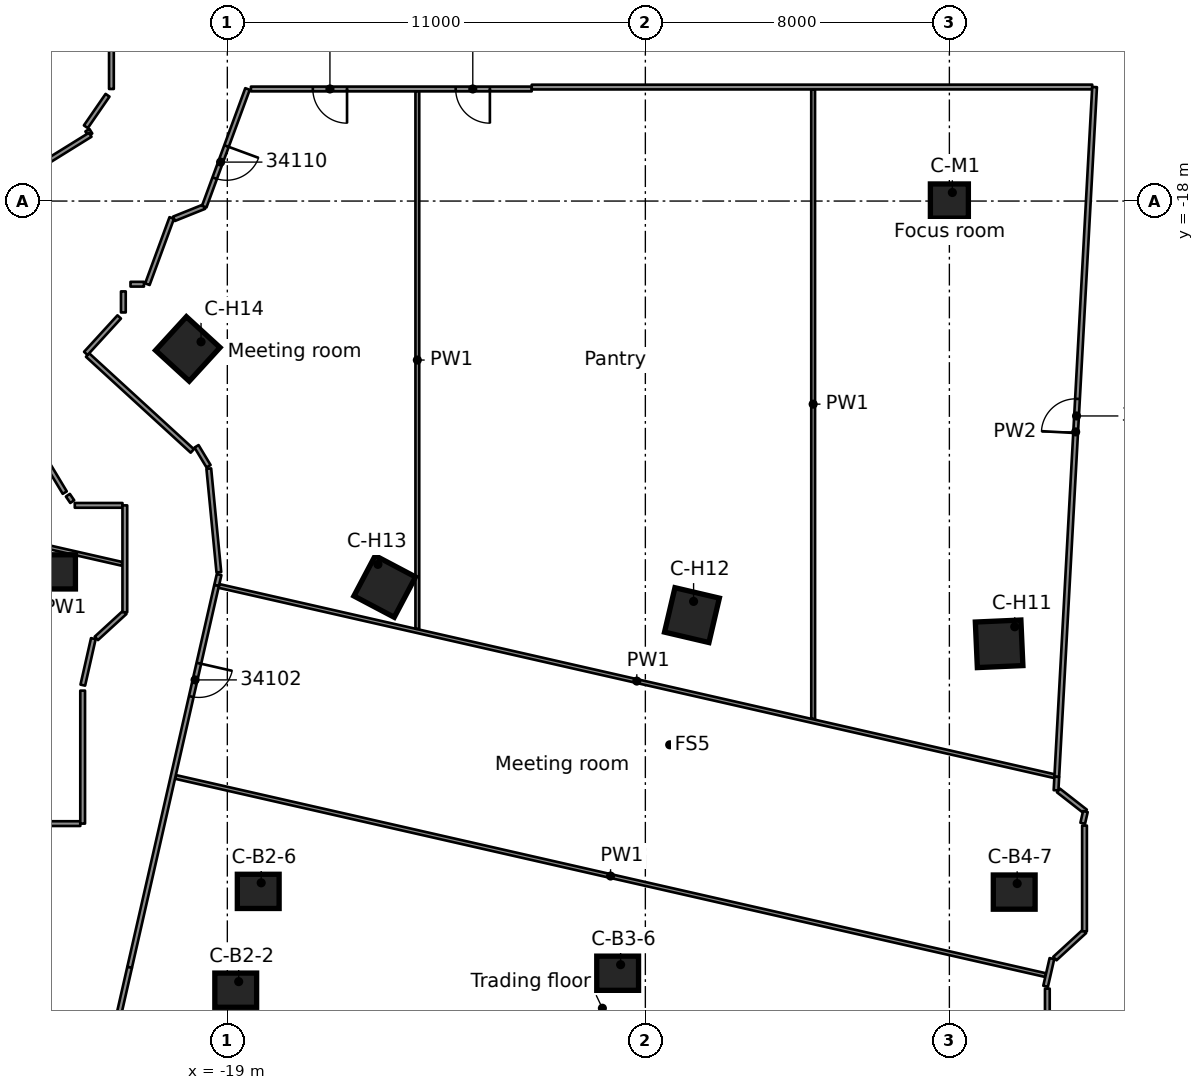
"""IFC4 building model, lengths in metres.
Left out: names, types, materials, properties, quantities, classifications, styles, units other than length and angle.
Written with IfcOpenShell. Run it as: python <this file> out.ifc"""

import sys

from ifc_helpers import new_model, si_unit, direction, frame, frame_2d, origin, origin_2d, place, context, subcontext, project, spatial, rectangle, extrude, element, fill, save


model = new_model("IFC4")
c1 = context("Model", 3, precision=1e-05, world=origin(), true_north=direction((0.0, 1.0)))
c2 = subcontext(c1, "Body", "Model", "MODEL_VIEW")
j1 = project(units=[si_unit("LENGTHUNIT", "METRE"), si_unit("PLANEANGLEUNIT", "RADIAN")], contexts=[c1])
p1 = place(None, origin())
s1 = spatial("IfcSite", under=j1, at=p1, CompositionType="ELEMENT")
p2 = place(p1, origin())
s2 = spatial("IfcBuilding", under=s1, at=p2, CompositionType="ELEMENT")
p3 = place(p2, frame((0.0, 0.0, 167.1)))
s3 = spatial("IfcBuildingStorey", under=s2, at=p3, CompositionType="ELEMENT", Elevation=167.1)
for number, where, z_axis, x_axis in (
    (1, (-23.547, -27.757, 0.0), (0.0, 0.0, 1.0), (1.0, 0.0, 0.0)),
    (2, (-18.779, -38.764, 0.0), (0.0, 0.0, 1.0), (1.0, 0.0, 0.0)),
    (3, (-18.187, -36.164, 0.0), (0.0, 0.0, 1.0), (1.0, 0.0, 0.0)),
    (4, (-8.729, -38.318, 0.0), (0.0, 0.0, 1.0), (1.0, 0.0, 0.0)),
    (5, (1.706, -36.183, 0.0), (0.0, 0.0, 1.0), (1.0, 0.0, 0.0)),
):
    element("IfcColumn", number, at=place(p3, frame(where, z_axis=z_axis, x_axis=x_axis)), inside=s3, PredefinedType="COLUMN", context=c2, shape_type="SweptSolid", body=[
        extrude(rectangle(XDim=1.1, YDim=0.9, at=origin_2d()), origin(), (0.0, 0.0, 1.0), 3.5),
    ])
for number, where, z_axis, x_axis in (
    (6, (1.309, -29.65, 0.0), (0.0, 0.0, 1.0), (0.044, -0.999, 0.0)),
    (7, (-6.774, -28.895, 0.0), (0.0, 0.0, 1.0), (-0.228, -0.974, 0.0)),
    (8, (-14.858, -28.141, 0.0), (0.0, 0.0, 1.0), (-0.467, -0.884, 0.0)),
    (9, (-20.04, -21.891, 0.0), (0.0, 0.0, 1.0), (-0.675, -0.738, 0.0)),
):
    element("IfcColumn", number, at=place(p3, frame(where, z_axis=z_axis, x_axis=x_axis)), inside=s3, PredefinedType="COLUMN", context=c2, shape_type="SweptSolid", body=[
        extrude(rectangle(XDim=1.2, YDim=1.2, at=origin_2d()), origin(), (0.0, 0.0, 1.0), 3.5),
    ])
p4 = place(p3, frame((0.0, -18.0, 0.0), z_axis=(0.0, 0.0, 1.0), x_axis=(1.0, 0.0, 0.0)))
e10 = element("IfcColumn", 10, at=p4, inside=s3, PredefinedType="COLUMN", context=c2, shape_type="SweptSolid", body=[
    extrude(rectangle(XDim=1.0, YDim=0.9, at=origin_2d()), origin(), (0.0, 0.0, 1.0), 3.5),
])
p5 = place(p3, frame((-3.585, -15.062, 0.0), z_axis=(0.0, 0.0, 1.0), x_axis=(5.895705e-05, -0.999999998262, 0.0)))
e11 = element("IfcWall", 11, at=p5, inside=s3, PredefinedType="PARTITIONING", context=c2, shape_type="SweptSolid", body=[
    extrude(rectangle(XDim=16.564, YDim=0.1, at=frame_2d((8.282, 0.0))), origin(), (0.0, 0.0, 1.0), 3.06),
])
p6 = place(p3, frame((-19.488, -25.04, 0.0), z_axis=(0.0, 0.0, 1.0), x_axis=(0.096768426033, -0.995306923377, 0.0)))
e12 = element("IfcWall", 12, at=p6, inside=s3, PredefinedType="PARTITIONING", context=c2, shape_type="SweptSolid", body=[
    extrude(rectangle(XDim=2.74, YDim=0.125, at=frame_2d((1.37, 0.0))), origin(), (0.0, 0.0, 1.0), 3.06),
])
p7 = place(p3, frame((-25.194, -22.482, 0.0), z_axis=(0.0, 0.0, 1.0), x_axis=(0.514871972741, -0.857267083053, 0.0)))
e13 = element("IfcWall", 13, at=p7, inside=s3, PredefinedType="PARTITIONING", context=c2, shape_type="SweptSolid", body=[
    extrude(rectangle(XDim=3.721, YDim=0.125, at=frame_2d((1.861, 0.0))), origin(), (0.0, 0.0, 1.0), 3.06),
])
p8 = place(p3, frame((-19.81, -24.453, 0.0), z_axis=(0.0, 0.0, 1.0), x_axis=(0.515783755321, -0.856718809031, 0.0)))
e14 = element("IfcWall", 14, at=p8, inside=s3, PredefinedType="PARTITIONING", context=c2, shape_type="SweptSolid", body=[
    extrude(rectangle(XDim=0.613, YDim=0.125, at=frame_2d((0.307, 0.0))), origin(), (0.0, 0.0, 1.0), 3.06),
])
p9 = place(p3, frame((-22.682, -16.135, 0.0), z_axis=(0.0, 0.0, 1.0), x_axis=(0.530154156877, -0.847901273702, 0.0)))
e15 = element("IfcWall", 15, at=p9, inside=s3, PredefinedType="PARTITIONING", context=c2, shape_type="SweptSolid", body=[
    extrude(rectangle(XDim=0.141, YDim=0.125, at=frame_2d((0.071, 0.0))), origin(), (0.0, 0.0, 1.0), 3.06),
])
p10 = place(p3, frame((-23.196, -25.74, 0.0), z_axis=(0.0, 0.0, 1.0), x_axis=(0.562669402068, -0.826682008983, 0.0)))
e16 = element("IfcWall", 16, at=p10, inside=s3, PredefinedType="PARTITIONING", context=c2, shape_type="SweptSolid", body=[
    extrude(rectangle(XDim=0.204, YDim=0.125, at=frame_2d((0.102, 0.0))), origin(), (0.0, 0.0, 1.0), 3.06),
])
p11 = place(p3, frame((-22.678, -22.051, 0.0), z_axis=(0.0, 0.0, 1.0), x_axis=(0.737457793855, -0.675393220489, 0.0)))
e17 = element("IfcWall", 17, at=p11, inside=s3, PredefinedType="PARTITIONING", context=c2, shape_type="SweptSolid", body=[
    extrude(rectangle(XDim=3.737, YDim=0.125, at=frame_2d((1.869, 0.0))), origin(), (0.0, 0.0, 1.0), 3.06),
])
p12 = place(p3, frame((-20.404, -18.467, 0.0), z_axis=(0.0, 0.0, 1.0), x_axis=(0.927827745757, 0.373008946546, 0.0)))
e18 = element("IfcWall", 18, at=p12, inside=s3, PredefinedType="PARTITIONING", context=c2, shape_type="SweptSolid", body=[
    extrude(rectangle(XDim=0.858, YDim=0.125, at=frame_2d((0.429, 0.0))), origin(), (0.0, 0.0, 1.0), 3.06),
])
p13 = place(p3, frame((-20.366, -33.152, 0.0), z_axis=(0.0, 0.0, 1.0), x_axis=(0.975030849226, -0.222069455479, 0.0)))
e19 = element("IfcWall", 19, at=p13, inside=s3, PredefinedType="PARTITIONING", context=c2, shape_type="SweptSolid", body=[
    extrude(rectangle(XDim=23.487, YDim=0.1, at=frame_2d((11.744, 0.0))), origin(), (0.0, 0.0, 1.0), 3.06),
])
p14 = place(p3, frame((-26.784, -26.404, 0.0), z_axis=(0.0, 0.0, 1.0), x_axis=(0.975025922796, -0.22209108464, 0.0)))
e20 = element("IfcWall", 20, at=p14, inside=s3, PredefinedType="PARTITIONING", context=c2, shape_type="SweptSolid", body=[
    extrude(rectangle(XDim=5.141, YDim=0.1, at=frame_2d((2.571, 0.0))), origin(), (0.0, 0.0, 1.0), 3.06),
])
p15 = place(p3, frame((-19.221, -28.127, 0.0), z_axis=(0.0, 0.0, 1.0), x_axis=(0.975047400712, -0.22199677107, 0.0)))
e21 = element("IfcWall", 21, at=p15, inside=s3, PredefinedType="PARTITIONING", context=c2, shape_type="SweptSolid", body=[
    extrude(rectangle(XDim=22.555, YDim=0.1, at=frame_2d((11.277, 0.0))), origin(), (0.0, 0.0, 1.0), 3.06),
])
p16 = place(p3, frame((2.869, -33.508, 0.0), z_axis=(0.0, 0.0, 1.0), x_axis=(0.787979198173, -0.615701862306, 0.0)))
e22 = element("IfcWall", 22, at=p16, inside=s3, PredefinedType="PARTITIONING", context=c2, shape_type="SweptSolid", body=[
    extrude(rectangle(XDim=0.901, YDim=0.125, at=frame_2d((0.451, 0.0))), origin(), (0.0, 0.0, 1.0), 3.06),
])
p17 = place(p3, frame((2.776, -37.932, 0.0), z_axis=(0.0, 0.0, 1.0), x_axis=(0.736321314263, 0.676632043404, 0.0)))
e23 = element("IfcWall", 23, at=p17, inside=s3, PredefinedType="PARTITIONING", context=c2, shape_type="SweptSolid", body=[
    extrude(rectangle(XDim=1.059, YDim=0.125, at=frame_2d((0.53, 0.0))), origin(), (0.0, 0.0, 1.0), 3.06),
])
p18 = place(p3, frame((-24.325, -34.381, 0.0), z_axis=(0.0, 0.0, 1.0), x_axis=(1.0, 0.0, 0.0)))
e24 = element("IfcWall", 24, at=p18, inside=s3, PredefinedType="PARTITIONING", context=c2, shape_type="SweptSolid", body=[
    extrude(rectangle(XDim=1.456, YDim=0.125, at=frame_2d((0.728, 0.0))), origin(), (0.0, 0.0, 1.0), 3.06),
])
p19 = place(p3, frame((-22.447, -29.507, 0.0), z_axis=(0.0, 0.0, 1.0), x_axis=(0.737393225099, 0.67546371596, 0.0)))
e25 = element("IfcWall", 25, at=p19, inside=s3, PredefinedType="PARTITIONING", context=c2, shape_type="SweptSolid", body=[
    extrude(rectangle(XDim=1.017, YDim=0.125, at=frame_2d((0.509, 0.0))), origin(), (0.0, 0.0, 1.0), 3.06),
])
p20 = place(p3, frame((-23.014, -26.007, 0.0), z_axis=(0.0, 0.0, 1.0), x_axis=(1.0, 0.0, 0.0)))
e26 = element("IfcWall", 26, at=p20, inside=s3, PredefinedType="PARTITIONING", context=c2, shape_type="SweptSolid", body=[
    extrude(rectangle(XDim=1.255, YDim=0.125, at=frame_2d((0.627, 0.0))), origin(), (0.0, 0.0, 1.0), 3.06),
])
p21 = place(p3, frame((-21.548, -20.188, 0.0), z_axis=(0.0, 0.0, 1.0), x_axis=(1.0, 0.0, 0.0)))
e27 = element("IfcWall", 27, at=p21, inside=s3, PredefinedType="PARTITIONING", context=c2, shape_type="SweptSolid", body=[
    extrude(rectangle(XDim=0.354, YDim=0.125, at=frame_2d((0.177, 0.0))), origin(), (0.0, 0.0, 1.0), 3.06),
])
p22 = place(p3, frame((-10.991, -15.051, 0.0), z_axis=(0.0, 0.0, 1.0), x_axis=(-1.0, 0.0, 0.0)))
e28 = element("IfcWall", 28, at=p22, inside=s3, PredefinedType="PARTITIONING", context=c2, shape_type="SweptSolid", body=[
    extrude(rectangle(XDim=7.388, YDim=0.125, at=frame_2d((3.694, 0.0))), origin(), (0.0, 0.0, 1.0), 3.06),
])
p23 = place(p22, frame((4.859, 0.0, 0.0)))
e29 = element("IfcOpeningElement", 29, at=p23, cuts=e28, PredefinedType="OPENING", context=c2, shape_type="SweptSolid", body=[
    extrude(rectangle(XDim=0.9, YDim=2.1, at=frame_2d((0.45, 1.05))), frame((0.0, 0.073, 0.0), z_axis=(0.0, -1.0, 0.0), x_axis=(1.0, 0.0, 0.0)), (0.0, 0.0, 1.0), 0.145),
])
p24 = place(p22, frame((1.1, 0.0, 0.0)))
e30 = element("IfcOpeningElement", 30, at=p24, cuts=e28, PredefinedType="OPENING", context=c2, shape_type="SweptSolid", body=[
    extrude(rectangle(XDim=0.9, YDim=2.1, at=frame_2d((0.45, 1.05))), frame((0.0, 0.073, 0.0), z_axis=(0.0, -1.0, 0.0), x_axis=(1.0, 0.0, 0.0)), (0.0, 0.0, 1.0), 0.145),
])
p25 = place(p3, frame((-10.99, -15.001, 0.0), z_axis=(0.0, 0.0, 1.0), x_axis=(0.999999991232, 0.000132424021, 0.0)))
e31 = element("IfcWall", 31, at=p25, inside=s3, PredefinedType="PARTITIONING", context=c2, shape_type="SweptSolid", body=[
    extrude(rectangle(XDim=14.749, YDim=0.125, at=frame_2d((7.375, 0.0))), origin(), (0.0, 0.0, 1.0), 3.06),
])
p26 = place(p3, frame((-24.779, -17.603, 0.0), z_axis=(0.0, 0.0, 1.0), x_axis=(0.849651970117, 0.527343843878, 0.0)))
e32 = element("IfcWall", 32, at=p26, inside=s3, PredefinedType="PARTITIONING", context=c2, shape_type="SweptSolid", body=[
    extrude(rectangle(XDim=2.556, YDim=0.125, at=frame_2d((1.278, 0.0))), origin(), (0.0, 0.0, 1.0), 3.06),
])
p27 = place(p3, frame((-22.724, -22.009, 0.0), z_axis=(0.0, 0.0, 1.0), x_axis=(0.675384834857, 0.737465473663, 0.0)))
e33 = element("IfcWall", 33, at=p27, inside=s3, PredefinedType="PARTITIONING", context=c2, shape_type="SweptSolid", body=[
    extrude(rectangle(XDim=1.302, YDim=0.125, at=frame_2d((0.651, 0.0))), origin(), (0.0, 0.0, 1.0), 3.06),
])
p28 = place(p3, frame((-22.723, -16.045, 0.0), z_axis=(0.0, 0.0, 1.0), x_axis=(0.567177272103, 0.823595739431, 0.0)))
e34 = element("IfcWall", 34, at=p28, inside=s3, PredefinedType="PARTITIONING", context=c2, shape_type="SweptSolid", body=[
    extrude(rectangle(XDim=1.006, YDim=0.125, at=frame_2d((0.503, 0.0))), origin(), (0.0, 0.0, 1.0), 3.06),
])
p29 = place(p3, frame((-18.469, -15.051, 0.0), z_axis=(0.0, 0.0, 1.0), x_axis=(-0.345252599318, -0.938509798918, 0.0)))
e35 = element("IfcWall", 35, at=p29, inside=s3, PredefinedType="PARTITIONING", context=c2, shape_type="SweptSolid", body=[
    extrude(rectangle(XDim=3.299, YDim=0.125, at=frame_2d((1.649, 0.0))), origin(), (0.0, 0.0, 1.0), 3.06),
])
p30 = place(p29, frame((1.6, 0.0, 0.0)))
e36 = element("IfcOpeningElement", 36, at=p30, cuts=e35, PredefinedType="OPENING", context=c2, shape_type="SweptSolid", body=[
    extrude(rectangle(XDim=0.9, YDim=2.1, at=frame_2d((0.45, 1.05))), frame((0.0, 0.073, 0.0), z_axis=(0.0, -1.0, 0.0), x_axis=(1.0, 0.0, 0.0)), (0.0, 0.0, 1.0), 0.145),
])
p31 = place(p3, frame((-21.104, -20.188, 0.0), z_axis=(0.0, 0.0, 1.0), x_axis=(0.345224027465, 0.938520309243, 0.0)))
e37 = element("IfcWall", 37, at=p31, inside=s3, PredefinedType="PARTITIONING", context=c2, shape_type="SweptSolid", body=[
    extrude(rectangle(XDim=1.857, YDim=0.125, at=frame_2d((0.929, 0.0))), origin(), (0.0, 0.0, 1.0), 3.06),
])
p32 = place(p3, frame((2.532, -38.661, 0.0), z_axis=(0.0, 0.0, 1.0), x_axis=(0.222398515533, 0.974955845302, 0.0)))
e38 = element("IfcWall", 38, at=p32, inside=s3, PredefinedType="PARTITIONING", context=c2, shape_type="SweptSolid", body=[
    extrude(rectangle(XDim=0.747, YDim=0.125, at=frame_2d((0.373, 0.0))), origin(), (0.0, 0.0, 1.0), 3.06),
])
p33 = place(p3, frame((-19.282, -28.113, 0.0), z_axis=(0.0, 0.0, 1.0), x_axis=(0.222961356433, 0.974827283952, 0.0)))
e39 = element("IfcWall", 39, at=p33, inside=s3, PredefinedType="PARTITIONING", context=c2, shape_type="SweptSolid", body=[
    extrude(rectangle(XDim=0.291, YDim=0.125, at=frame_2d((0.146, 0.0))), origin(), (0.0, 0.0, 1.0), 3.06),
])
p34 = place(p3, frame((3.509, -34.372, 0.0), z_axis=(0.0, 0.0, 1.0), x_axis=(0.221088338472, 0.975253785736, 0.0)))
e40 = element("IfcWall", 40, at=p34, inside=s3, PredefinedType="PARTITIONING", context=c2, shape_type="SweptSolid", body=[
    extrude(rectangle(XDim=0.317, YDim=0.125, at=frame_2d((0.158, 0.0))), origin(), (0.0, 0.0, 1.0), 3.06),
])
p35 = place(p3, frame((-19.283, -28.115, 0.0), z_axis=(0.0, 0.0, 1.0), x_axis=(-0.222050161604, -0.975035243328, 0.0)))
e41 = element("IfcWall", 41, at=p35, inside=s3, PredefinedType="PARTITIONING", context=c2, shape_type="SweptSolid", body=[
    extrude(rectangle(XDim=10.304, YDim=0.125, at=frame_2d((5.152, 0.0))), origin(), (0.0, 0.0, 1.0), 3.06),
])
p36 = place(p35, frame((2.098, 0.0, 0.0)))
e42 = element("IfcOpeningElement", 42, at=p36, cuts=e41, PredefinedType="OPENING", context=c2, shape_type="SweptSolid", body=[
    extrude(rectangle(XDim=0.9, YDim=2.1, at=frame_2d((0.45, 1.05))), frame((0.0, 0.073, 0.0), z_axis=(0.0, -1.0, 0.0), x_axis=(1.0, 0.0, 0.0)), (0.0, 0.0, 1.0), 0.145),
])
p37 = place(p3, frame((-21.903, -39.621, 0.0), z_axis=(0.0, 0.0, 1.0), x_axis=(0.221903185503, 0.975068703356, 0.0)))
e43 = element("IfcWall", 43, at=p37, inside=s3, PredefinedType="PARTITIONING", context=c2, shape_type="SweptSolid", body=[
    extrude(rectangle(XDim=1.496, YDim=0.125, at=frame_2d((0.748, 0.0))), origin(), (0.0, 0.0, 1.0), 3.06),
])
p38 = place(p3, frame((-22.803, -30.737, 0.0), z_axis=(0.0, 0.0, 1.0), x_axis=(0.220947936247, 0.975285604051, 0.0)))
e44 = element("IfcWall", 44, at=p38, inside=s3, PredefinedType="PARTITIONING", context=c2, shape_type="SweptSolid", body=[
    extrude(rectangle(XDim=1.254, YDim=0.125, at=frame_2d((0.627, 0.0))), origin(), (0.0, 0.0, 1.0), 3.06),
])
p39 = place(p3, frame((2.826, -33.149, 0.0), z_axis=(0.0, 0.0, 1.0), x_axis=(0.054748402429, 0.998500181488, 0.0)))
e45 = element("IfcWall", 45, at=p39, inside=s3, PredefinedType="PARTITIONING", context=c2, shape_type="SweptSolid", body=[
    extrude(rectangle(XDim=18.176, YDim=0.125, at=frame_2d((9.088, 0.0))), origin(), (0.0, 0.0, 1.0), 3.06),
])
p40 = place(p39, frame((9.059, 0.0, 0.0)))
e46 = element("IfcOpeningElement", 46, at=p40, cuts=e45, PredefinedType="OPENING", context=c2, shape_type="SweptSolid", body=[
    extrude(rectangle(XDim=0.9, YDim=2.1, at=frame_2d((0.45, 1.05))), frame((0.0, 0.073, 0.0), z_axis=(0.0, -1.0, 0.0), x_axis=(1.0, 0.0, 0.0)), (0.0, 0.0, 1.0), 0.145),
])
p41 = place(p3, frame((2.807, -33.504, 0.0), z_axis=(0.0, 0.0, 1.0), x_axis=(0.053568093203, 0.998564198933, 0.0)))
e47 = element("IfcWall", 47, at=p41, inside=s3, PredefinedType="PARTITIONING", context=c2, shape_type="SweptSolid", body=[
    extrude(rectangle(XDim=0.355, YDim=0.125, at=frame_2d((0.178, 0.0))), origin(), (0.0, 0.0, 1.0), 3.06),
])
p42 = place(p3, frame((3.556, -37.215, 0.0), z_axis=(0.0, 0.0, 1.0), x_axis=(0.0, 1.0, 0.0)))
e48 = element("IfcWall", 48, at=p42, inside=s3, PredefinedType="PARTITIONING", context=c2, shape_type="SweptSolid", body=[
    extrude(rectangle(XDim=2.782, YDim=0.125, at=frame_2d((1.391, 0.0))), origin(), (0.0, 0.0, 1.0), 3.06),
])
p43 = place(p3, frame((2.578, -41.693, 0.0), z_axis=(0.0, 0.0, 1.0), x_axis=(0.0, 1.0, 0.0)))
e49 = element("IfcWall", 49, at=p43, inside=s3, PredefinedType="PARTITIONING", context=c2, shape_type="SweptSolid", body=[
    extrude(rectangle(XDim=2.97, YDim=0.125, at=frame_2d((1.485, 0.0))), origin(), (0.0, 0.0, 1.0), 3.06),
])
p44 = place(p3, frame((-14.0, -29.253, 0.0), z_axis=(0.0, 0.0, 1.0), x_axis=(0.0, 1.0, 0.0)))
e50 = element("IfcWall", 50, at=p44, inside=s3, PredefinedType="PARTITIONING", context=c2, shape_type="SweptSolid", body=[
    extrude(rectangle(XDim=14.139, YDim=0.1, at=frame_2d((7.069, 0.0))), origin(), (0.0, 0.0, 1.0), 3.06),
])
p45 = place(p3, frame((-21.697, -28.82, 0.0), z_axis=(0.0, 0.0, 1.0), x_axis=(0.0, 1.0, 0.0)))
e51 = element("IfcWall", 51, at=p45, inside=s3, PredefinedType="PARTITIONING", context=c2, shape_type="SweptSolid", body=[
    extrude(rectangle(XDim=2.813, YDim=0.125, at=frame_2d((1.406, 0.0))), origin(), (0.0, 0.0, 1.0), 3.06),
])
p46 = place(p3, frame((-21.736, -20.931, 0.0), z_axis=(0.0, 0.0, 1.0), x_axis=(0.0, 1.0, 0.0)))
e52 = element("IfcWall", 52, at=p46, inside=s3, PredefinedType="PARTITIONING", context=c2, shape_type="SweptSolid", body=[
    extrude(rectangle(XDim=0.554, YDim=0.125, at=frame_2d((0.277, 0.0))), origin(), (0.0, 0.0, 1.0), 3.06),
])
p47 = place(p3, frame((-22.05, -15.051, 0.0), z_axis=(0.0, 0.0, 1.0), x_axis=(0.0, 1.0, 0.0)))
e53 = element("IfcWall", 53, at=p47, inside=s3, PredefinedType="PARTITIONING", context=c2, shape_type="SweptSolid", body=[
    extrude(rectangle(XDim=30.102, YDim=0.125, at=frame_2d((15.051, 0.0))), origin(), (0.0, 0.0, 1.0), 3.06),
])
p48 = place(p47, frame((6.6, 0.0, 0.0)))
e54 = element("IfcOpeningElement", 54, at=p48, cuts=e53, PredefinedType="OPENING", context=c2, shape_type="SweptSolid", body=[
    extrude(rectangle(XDim=1.8, YDim=2.1, at=frame_2d((0.9, 1.05))), frame((0.0, 0.073, 0.0), z_axis=(0.0, -1.0, 0.0), x_axis=(1.0, 0.0, 0.0)), (0.0, 0.0, 1.0), 0.145),
])
p49 = place(p47, frame((21.651, 0.0, 0.0)))
e55 = element("IfcOpeningElement", 55, at=p49, cuts=e53, PredefinedType="OPENING", context=c2, shape_type="SweptSolid", body=[
    extrude(rectangle(XDim=1.8, YDim=2.1, at=frame_2d((0.9, 1.05))), frame((0.0, 0.073, 0.0), z_axis=(0.0, -1.0, 0.0), x_axis=(1.0, 0.0, 0.0)), (0.0, 0.0, 1.0), 0.145),
])
p50 = place(p3, frame((-22.807, -34.381, 0.0), z_axis=(0.0, 0.0, 1.0), x_axis=(0.0, 1.0, 0.0)))
e56 = element("IfcWall", 56, at=p50, inside=s3, PredefinedType="PARTITIONING", context=c2, shape_type="SweptSolid", body=[
    extrude(rectangle(XDim=3.499, YDim=0.125, at=frame_2d((1.75, 0.0))), origin(), (0.0, 0.0, 1.0), 3.06),
])
p51 = place(p36, origin())
e57 = element("IfcDoor", 57, at=p51, inside=s3, OperationType="SINGLE_SWING_LEFT", PredefinedType="DOOR", context=c2, shape_type="SweptSolid", body=[
    extrude(rectangle(XDim=0.9, YDim=2.1, at=frame_2d((0.45, 1.05))), frame((0.0, 0.025, 0.0), z_axis=(0.0, -1.0, 0.0), x_axis=(1.0, 0.0, 0.0)), (0.0, 0.0, 1.0), 0.05),
])
fill(e42, e57)
p52 = place(p30, origin())
e58 = element("IfcDoor", 58, at=p52, inside=s3, OperationType="SINGLE_SWING_RIGHT", PredefinedType="DOOR", context=c2, shape_type="SweptSolid", body=[
    extrude(rectangle(XDim=0.9, YDim=2.1, at=frame_2d((0.45, 1.05))), frame((0.0, 0.025, 0.0), z_axis=(0.0, -1.0, 0.0), x_axis=(1.0, 0.0, 0.0)), (0.0, 0.0, 1.0), 0.05),
])
fill(e36, e58)
p53 = place(p23, origin())
e59 = element("IfcDoor", 59, at=p53, inside=s3, OperationType="SINGLE_SWING_RIGHT", PredefinedType="DOOR", context=c2, shape_type="SweptSolid", body=[
    extrude(rectangle(XDim=0.9, YDim=2.1, at=frame_2d((0.45, 1.05))), frame((0.0, 0.025, 0.0), z_axis=(0.0, -1.0, 0.0), x_axis=(1.0, 0.0, 0.0)), (0.0, 0.0, 1.0), 0.05),
])
fill(e29, e59)
p54 = place(p24, origin())
e60 = element("IfcDoor", 60, at=p54, inside=s3, OperationType="SINGLE_SWING_LEFT", PredefinedType="DOOR", context=c2, shape_type="SweptSolid", body=[
    extrude(rectangle(XDim=0.9, YDim=2.1, at=frame_2d((0.45, 1.05))), frame((0.0, 0.025, 0.0), z_axis=(0.0, -1.0, 0.0), x_axis=(1.0, 0.0, 0.0)), (0.0, 0.0, 1.0), 0.05),
])
fill(e30, e60)
p55 = place(p40, origin())
e61 = element("IfcDoor", 61, at=p55, inside=s3, OperationType="SINGLE_SWING_RIGHT", PredefinedType="DOOR", context=c2, shape_type="SweptSolid", body=[
    extrude(rectangle(XDim=0.9, YDim=2.1, at=frame_2d((0.45, 1.05))), frame((0.0, 0.025, 0.0), z_axis=(0.0, -1.0, 0.0), x_axis=(1.0, 0.0, 0.0)), (0.0, 0.0, 1.0), 0.05),
])
fill(e46, e61)
save(model, sys.argv[1])
